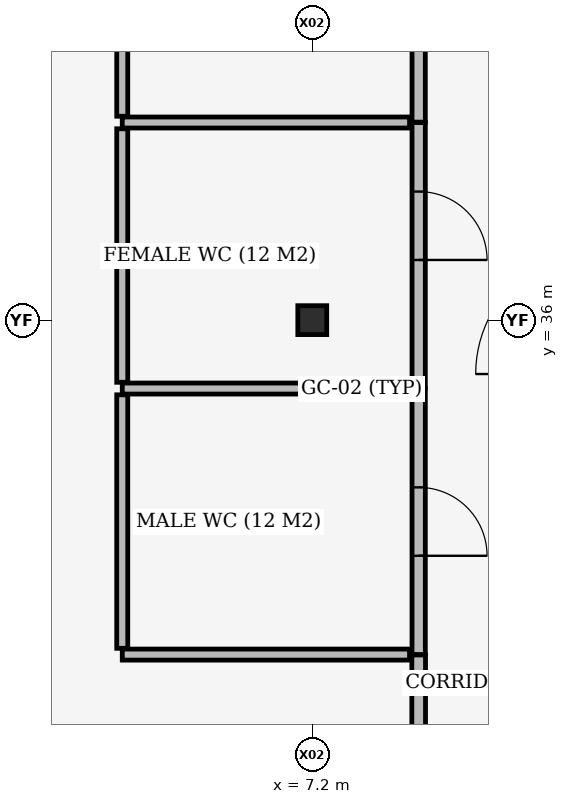
"""IFC4 building model, lengths in metres.
Left out: names, types, materials, properties, quantities, classifications, styles, units other than length and angle.
Written with IfcOpenShell. Run it as: python <this file> out.ifc"""

import sys

from ifc_helpers import new_model, si_unit, direction, frame, frame_2d, origin, origin_2d, place, context, subcontext, project, spatial, rectangle, extrude, element, fill, save


model = new_model("IFC4")
c1 = context("Model", 3, precision=1e-05, world=origin(), true_north=direction((0.0, 1.0)))
c2 = subcontext(c1, "Body", "Model", "MODEL_VIEW")
j1 = project(units=[si_unit("LENGTHUNIT", "METRE"), si_unit("PLANEANGLEUNIT", "RADIAN")], contexts=[c1])
p1 = place(None, origin())
s1 = spatial("IfcSite", under=j1, at=p1, CompositionType="ELEMENT")
p2 = place(p1, origin())
s2 = spatial("IfcBuilding", under=s1, at=p2, CompositionType="ELEMENT")
p3 = place(p2, frame((0.0, 0.0, 13.8)))
s3 = spatial("IfcBuildingStorey", under=s2, at=p3, CompositionType="ELEMENT", Elevation=13.8)
p4 = place(p3, frame((7.2, 36.0, 0.0), z_axis=(0.0, 0.0, 1.0), x_axis=(1.0, 0.0, 0.0)))
e1 = element("IfcColumn", 1, at=p4, inside=s3, PredefinedType="COLUMN", context=c2, shape_type="SweptSolid", body=[
    extrude(rectangle(XDim=0.38, YDim=0.38, at=origin_2d()), origin(), (0.0, 0.0, 1.0), 3.92),
])
p5 = place(p3, frame((8.6, 31.6, 0.0), z_axis=(0.0, 0.0, 1.0), x_axis=(0.0, 1.0, 0.0)))
e2 = element("IfcWall", 2, at=p5, inside=s3, PredefinedType="PLUMBINGWALL", context=c2, shape_type="SweptSolid", body=[
    extrude(rectangle(XDim=3.5, YDim=0.175, at=frame_2d((1.75, 0.0))), origin(), (0.0, 0.0, 1.0), 3.92),
])
p6 = place(p5, frame((1.3, 0.0, 0.0)))
e3 = element("IfcOpeningElement", 3, at=p6, cuts=e2, PredefinedType="OPENING", context=c2, shape_type="SweptSolid", body=[
    extrude(rectangle(XDim=0.9, YDim=2.1, at=frame_2d((0.45, 1.05))), frame((0.0, 0.097, 0.0), z_axis=(0.0, -1.0, 0.0), x_axis=(1.0, 0.0, 0.0)), (0.0, 0.0, 1.0), 0.195),
])
for number, where, z_axis, x_axis in (
    (4, (4.7, 31.6, 0.0), (0.0, 0.0, 1.0), (1.0, 0.0, 0.0)),
    (5, (4.7, 35.1, 0.0), (0.0, 0.0, 1.0), (1.0, 0.0, 0.0)),
):
    element("IfcWall", number, at=place(p3, frame(where, z_axis=z_axis, x_axis=x_axis)), inside=s3, PredefinedType="PLUMBINGWALL", context=c2, shape_type="SweptSolid", body=[
        extrude(rectangle(XDim=3.78, YDim=0.145, at=frame_2d((1.89, 0.0))), origin(), (0.0, 0.0, 1.0), 3.34),
    ])
p7 = place(p3, frame((4.7, 31.683, 0.0), z_axis=(0.0, 0.0, 1.0), x_axis=(0.0, 1.0, 0.0)))
e6 = element("IfcWall", 6, at=p7, inside=s3, PredefinedType="PLUMBINGWALL", context=c2, shape_type="SweptSolid", body=[
    extrude(rectangle(XDim=3.335, YDim=0.145, at=frame_2d((1.667, 0.0))), origin(), (0.0, 0.0, 1.0), 3.68),
])
p8 = place(p3, frame((8.6, 35.105, 0.0), z_axis=(0.0, 0.0, 1.0), x_axis=(0.0, 1.0, 0.0)))
e7 = element("IfcWall", 7, at=p8, inside=s3, PredefinedType="PLUMBINGWALL", context=c2, shape_type="SweptSolid", body=[
    extrude(rectangle(XDim=3.495, YDim=0.175, at=frame_2d((1.748, 0.0))), origin(), (0.0, 0.0, 1.0), 3.34),
])
p9 = place(p8, frame((1.687, 0.0, 0.0)))
e8 = element("IfcOpeningElement", 8, at=p9, cuts=e7, PredefinedType="OPENING", context=c2, shape_type="SweptSolid", body=[
    extrude(rectangle(XDim=0.9, YDim=2.1, at=frame_2d((0.45, 1.05))), frame((0.0, 0.097, 0.0), z_axis=(0.0, -1.0, 0.0), x_axis=(1.0, 0.0, 0.0)), (0.0, 0.0, 1.0), 0.195),
])
p10 = place(p3, frame((4.7, 38.6, 0.0), z_axis=(0.0, 0.0, 1.0), x_axis=(1.0, 0.0, 0.0)))
e9 = element("IfcWall", 9, at=p10, inside=s3, PredefinedType="PLUMBINGWALL", context=c2, shape_type="SweptSolid", body=[
    extrude(rectangle(XDim=3.78, YDim=0.145, at=frame_2d((1.89, 0.0))), origin(), (0.0, 0.0, 1.0), 3.28),
])
p11 = place(p3, frame((4.7, 35.183, 0.0), z_axis=(0.0, 0.0, 1.0), x_axis=(0.0, 1.0, 0.0)))
e10 = element("IfcWall", 10, at=p11, inside=s3, PredefinedType="PLUMBINGWALL", context=c2, shape_type="SweptSolid", body=[
    extrude(rectangle(XDim=3.335, YDim=0.145, at=frame_2d((1.667, 0.0))), origin(), (0.0, 0.0, 1.0), 3.4),
])
p12 = place(p3, frame((8.6, 38.605, 0.0), z_axis=(0.0, 0.0, 1.0), x_axis=(0.0, 1.0, 0.0)))
e11 = element("IfcWall", 11, at=p12, inside=s3, PredefinedType="PLUMBINGWALL", context=c2, shape_type="SweptSolid", body=[
    extrude(rectangle(XDim=2.995, YDim=0.175, at=frame_2d((1.498, 0.0))), origin(), (0.0, 0.0, 1.0), 3.92),
])
p13 = place(p12, frame((1.038, 0.0, 0.0)))
e12 = element("IfcOpeningElement", 12, at=p13, cuts=e11, PredefinedType="OPENING", context=c2, shape_type="SweptSolid", body=[
    extrude(rectangle(XDim=0.92, YDim=2.1, at=frame_2d((0.46, 1.05))), frame((0.0, 0.097, 0.0), z_axis=(0.0, -1.0, 0.0), x_axis=(1.0, 0.0, 0.0)), (0.0, 0.0, 1.0), 0.195),
])
p14 = place(p3, frame((4.7, 38.683, 0.0), z_axis=(0.0, 0.0, 1.0), x_axis=(0.0, 1.0, 0.0)))
e13 = element("IfcWall", 13, at=p14, inside=s3, PredefinedType="PLUMBINGWALL", context=c2, shape_type="SweptSolid", body=[
    extrude(rectangle(XDim=2.835, YDim=0.145, at=frame_2d((1.417, 0.0))), origin(), (0.0, 0.0, 1.0), 3.62),
])
p15 = place(p3, frame((8.6, 25.385, 0.0), z_axis=(0.0, 0.0, 1.0), x_axis=(0.0, 1.0, 0.0)))
e14 = element("IfcWall", 14, at=p15, inside=s3, PredefinedType="PARTITIONING", context=c2, shape_type="SweptSolid", body=[
    extrude(rectangle(XDim=6.21, YDim=0.18, at=frame_2d((3.105, 0.0))), origin(), (0.0, 0.0, 1.0), 3.4),
])
p16 = place(p15, frame((1.831, 0.0, 0.0)))
e15 = element("IfcOpeningElement", 15, at=p16, cuts=e14, PredefinedType="OPENING", context=c2, shape_type="SweptSolid", body=[
    extrude(rectangle(XDim=0.98, YDim=2.18, at=frame_2d((0.49, 1.09))), frame((0.0, 0.1, 0.0), z_axis=(0.0, -1.0, 0.0), x_axis=(1.0, 0.0, 0.0)), (0.0, 0.0, 1.0), 0.2),
])
p17 = place(p6, origin())
e16 = element("IfcDoor", 16, at=p17, inside=s3, OperationType="SINGLE_SWING_RIGHT", PredefinedType="DOOR", context=c2, shape_type="SweptSolid", body=[
    extrude(rectangle(XDim=0.9, YDim=2.1, at=frame_2d((0.45, 1.05))), frame((0.0, 0.025, 0.0), z_axis=(0.0, -1.0, 0.0), x_axis=(1.0, 0.0, 0.0)), (0.0, 0.0, 1.0), 0.05),
])
fill(e3, e16)
p18 = place(p9, origin())
e17 = element("IfcDoor", 17, at=p18, inside=s3, OperationType="SINGLE_SWING_RIGHT", PredefinedType="DOOR", context=c2, shape_type="SweptSolid", body=[
    extrude(rectangle(XDim=0.9, YDim=2.1, at=frame_2d((0.45, 1.05))), frame((0.0, 0.025, 0.0), z_axis=(0.0, -1.0, 0.0), x_axis=(1.0, 0.0, 0.0)), (0.0, 0.0, 1.0), 0.05),
])
fill(e8, e17)
save(model, sys.argv[1])
